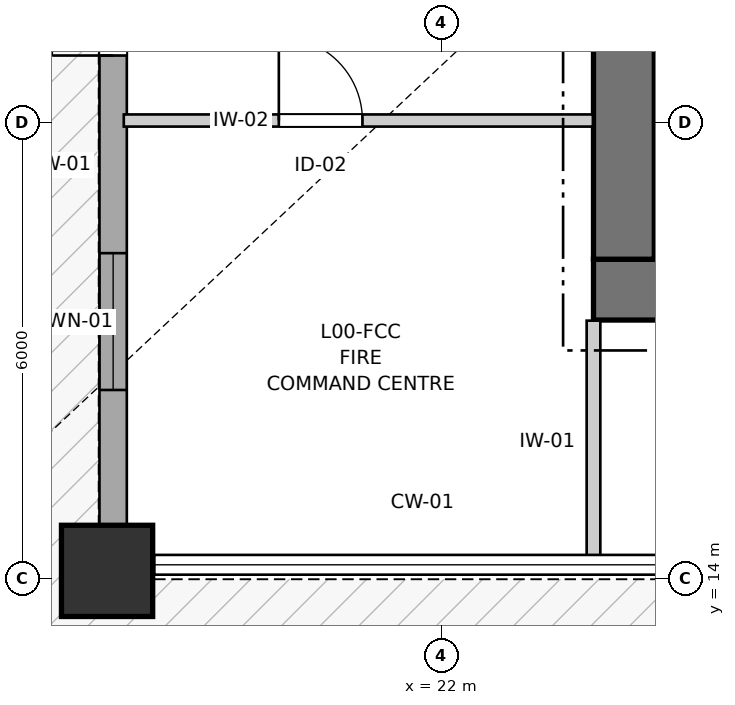
"""IFC4 building model, lengths in metres.
Left out: names, types, materials, properties, quantities, classifications, styles, units other than length and angle.
Written with IfcOpenShell. Run it as: python <this file> out.ifc"""

import sys

from ifc_helpers import new_model, si_unit, direction, frame, frame_2d, origin, origin_2d, place, context, subcontext, project, spatial, rectangle, extrude, source, transform, mapped, element, fill, save


model = new_model("IFC4")
c1 = context("Model", 3, precision=1e-05, world=origin(), true_north=direction((0.0, 1.0)))
c2 = subcontext(c1, "Body", "Model", "MODEL_VIEW")
j1 = project(units=[si_unit("LENGTHUNIT", "METRE"), si_unit("PLANEANGLEUNIT", "RADIAN")], contexts=[c1])
p1 = place(None, origin())
s1 = spatial("IfcSite", under=j1, at=p1, CompositionType="ELEMENT")
p2 = place(p1, origin())
s2 = spatial("IfcBuilding", under=s1, at=p2, CompositionType="ELEMENT")
p3 = place(p2, origin())
s3 = spatial("IfcBuildingStorey", under=s2, at=p3, CompositionType="ELEMENT", Elevation=0.0)
m1 = source(origin(), c2, "Body", "SweptSolid", [
    extrude(rectangle(XDim=1.2, YDim=1.2, at=origin_2d()), origin(), (0.0, 0.0, 1.0), 7.54),
])
p4 = place(p3, frame((17.6, 14.1, 0.0), z_axis=(0.0, 0.0, 1.0), x_axis=(1.0, 0.0, 0.0)))
e1 = element("IfcColumn", 1, at=p4, inside=s3, PredefinedType="COLUMN", context=c2, shape_type="MappedRepresentation", body=[
    mapped(m1, transform((0.0, 0.0, 0.0), x_axis=(1.0, 0.0, 0.0), y_axis=(0.0, 1.0, 0.0), z_axis=(0.0, 0.0, 1.0), scale=1.0)),
])
p5 = place(p3, frame((24.0, 17.8, 0.0), z_axis=(0.0, 0.0, 1.0), x_axis=(1.0, 0.0, 0.0)))
e2 = element("IfcWall", 2, at=p5, inside=s3, PredefinedType="SHEAR", context=c2, shape_type="SweptSolid", body=[
    extrude(rectangle(XDim=12.7, YDim=0.8, at=frame_2d((6.35, 0.0))), origin(), (0.0, 0.0, 1.0), 7.54),
])
p6 = place(p5, frame((7.0, 0.0, 0.0)))
e3 = element("IfcOpeningElement", 3, at=p6, cuts=e2, PredefinedType="OPENING", context=c2, shape_type="SweptSolid", body=[
    extrude(rectangle(XDim=0.98, YDim=2.15, at=frame_2d((0.49, 1.075))), frame((0.0, 0.41, 0.0), z_axis=(0.0, -1.0, 0.0), x_axis=(1.0, 0.0, 0.0)), (0.0, 0.0, 1.0), 0.82),
])
p7 = place(p3, frame((24.4, 33.8, 0.0), z_axis=(0.0, 0.0, 1.0), x_axis=(0.0, -1.0, 0.0)))
e4 = element("IfcWall", 4, at=p7, inside=s3, PredefinedType="SHEAR", context=c2, shape_type="SweptSolid", body=[
    extrude(rectangle(XDim=15.6, YDim=0.8, at=frame_2d((7.8, 0.0))), origin(), (0.0, 0.0, 1.0), 7.54),
])
p8 = place(p7, frame((7.05, 0.0, 0.0)))
e5 = element("IfcOpeningElement", 5, at=p8, cuts=e4, PredefinedType="OPENING", context=c2, shape_type="SweptSolid", body=[
    extrude(rectangle(XDim=1.5, YDim=2.15, at=frame_2d((0.75, 1.075))), frame((0.0, 0.41, 0.0), z_axis=(0.0, -1.0, 0.0), x_axis=(1.0, 0.0, 0.0)), (0.0, 0.0, 1.0), 0.82),
])
p9 = place(p7, frame((3.52, 0.0, 0.0)))
e6 = element("IfcOpeningElement", 6, at=p9, cuts=e4, PredefinedType="OPENING", context=c2, shape_type="SweptSolid", body=[
    extrude(rectangle(XDim=0.86, YDim=2.05, at=frame_2d((0.43, 1.025))), frame((0.0, 0.41, 0.0), z_axis=(0.0, -1.0, 0.0), x_axis=(1.0, 0.0, 0.0)), (0.0, 0.0, 1.0), 0.82),
])
p10 = place(p7, frame((11.22, 0.0, 0.0)))
e7 = element("IfcOpeningElement", 7, at=p10, cuts=e4, PredefinedType="OPENING", context=c2, shape_type="SweptSolid", body=[
    extrude(rectangle(XDim=0.86, YDim=2.05, at=frame_2d((0.43, 1.025))), frame((0.0, 0.41, 0.0), z_axis=(0.0, -1.0, 0.0), x_axis=(1.0, 0.0, 0.0)), (0.0, 0.0, 1.0), 0.82),
])
p11 = place(p3, frame((17.68, 14.68, 0.0), z_axis=(0.0, 0.0, 1.0), x_axis=(0.0, 1.0, 0.0)))
e8 = element("IfcWall", 8, at=p11, inside=s3, PredefinedType="SOLIDWALL", context=c2, shape_type="SweptSolid", body=[
    extrude(rectangle(XDim=9.53, YDim=0.36, at=frame_2d((4.765, 0.0))), origin(), (0.0, 0.0, 1.0), 6.02),
])
p12 = place(p11, frame((6.2, 0.0, 0.0)))
e9 = element("IfcOpeningElement", 9, at=p12, cuts=e8, PredefinedType="OPENING", context=c2, shape_type="SweptSolid", body=[
    extrude(rectangle(XDim=1.6, YDim=2.2, at=frame_2d((0.8, 1.1))), frame((0.0, 0.19, 0.0), z_axis=(0.0, -1.0, 0.0), x_axis=(1.0, 0.0, 0.0)), (0.0, 0.0, 1.0), 0.38),
])
p13 = place(p11, frame((1.8, 0.0, 1.0)))
e10 = element("IfcOpeningElement", 10, at=p13, cuts=e8, PredefinedType="OPENING", context=c2, shape_type="SweptSolid", body=[
    extrude(rectangle(XDim=1.8, YDim=1.45, at=frame_2d((0.9, 0.725))), frame((0.0, 0.19, 0.0), z_axis=(0.0, -1.0, 0.0), x_axis=(1.0, 0.0, 0.0)), (0.0, 0.0, 1.0), 0.38),
])
p14 = place(p3, frame((17.82, 20.025, 0.0), z_axis=(0.0, 0.0, 1.0), x_axis=(1.0, 0.0, 0.0)))
e11 = element("IfcWall", 11, at=p14, inside=s3, PredefinedType="PARTITIONING", context=c2, shape_type="SweptSolid", body=[
    extrude(rectangle(XDim=6.172, YDim=0.16, at=frame_2d((3.086, 0.0))), origin(), (0.0, 0.0, 1.0), 7.54),
])
p15 = place(p14, frame((2.04, 0.0, 0.0)))
e12 = element("IfcOpeningElement", 12, at=p15, cuts=e11, PredefinedType="OPENING", context=c2, shape_type="SweptSolid", body=[
    extrude(rectangle(XDim=1.1, YDim=2.15, at=frame_2d((0.55, 1.075))), frame((0.0, 0.09, 0.0), z_axis=(0.0, -1.0, 0.0), x_axis=(1.0, 0.0, 0.0)), (0.0, 0.0, 1.0), 0.18),
])
p16 = place(p3, frame((24.0, 14.207, 0.0), z_axis=(0.0, 0.0, 1.0), x_axis=(0.0, 1.0, 0.0)))
e13 = element("IfcWall", 13, at=p16, inside=s3, PredefinedType="PARTITIONING", context=c2, shape_type="SweptSolid", body=[
    extrude(rectangle(XDim=3.185, YDim=0.18, at=frame_2d((1.593, 0.0))), origin(), (0.0, 0.0, 1.0), 7.54),
])
m2 = source(origin(), c2, "Body", "SweptSolid", [
    extrude(rectangle(XDim=1.6, YDim=2.2, at=frame_2d((0.8, 1.1))), frame((0.0, 0.025, 0.0), z_axis=(0.0, -1.0, 0.0), x_axis=(1.0, 0.0, 0.0)), (0.0, 0.0, 1.0), 0.05),
])
p17 = place(p12, origin())
e14 = element("IfcDoor", 14, at=p17, inside=s3, OperationType="DOUBLE_DOOR_SINGLE_SWING", PredefinedType="DOOR", context=c2, shape_type="MappedRepresentation", body=[
    mapped(m2, transform((0.0, 0.0, 0.0), x_axis=(1.0, 0.0, 0.0), y_axis=(0.0, 1.0, 0.0), z_axis=(0.0, 0.0, 1.0), scale=1.0)),
])
fill(e9, e14)
m3 = source(origin(), c2, "Body", "SweptSolid", [
    extrude(rectangle(XDim=1.8, YDim=1.45, at=frame_2d((0.9, 0.725))), frame((0.0, 0.03, 0.0), z_axis=(0.0, -1.0, 0.0), x_axis=(1.0, 0.0, 0.0)), (0.0, 0.0, 1.0), 0.06),
])
p18 = place(p13, origin())
e15 = element("IfcWindow", 15, at=p18, inside=s3, PartitioningType="SINGLE_PANEL", PredefinedType="WINDOW", context=c2, shape_type="MappedRepresentation", body=[
    mapped(m3, transform((0.0, 0.0, 0.0), x_axis=(1.0, 0.0, 0.0), y_axis=(0.0, 1.0, 0.0), z_axis=(0.0, 0.0, 1.0), scale=1.0)),
])
fill(e10, e15)
m4 = source(origin(), c2, "Body", "SweptSolid", [
    extrude(rectangle(XDim=1.1, YDim=2.15, at=frame_2d((0.55, 1.075))), frame((0.0, 0.025, 0.0), z_axis=(0.0, -1.0, 0.0), x_axis=(1.0, 0.0, 0.0)), (0.0, 0.0, 1.0), 0.05),
])
p19 = place(p15, origin())
e16 = element("IfcDoor", 16, at=p19, inside=s3, OperationType="SINGLE_SWING_LEFT", PredefinedType="DOOR", context=c2, shape_type="MappedRepresentation", body=[
    mapped(m4, transform((0.0, 0.0, 0.0), x_axis=(1.0, 0.0, 0.0), y_axis=(0.0, 1.0, 0.0), z_axis=(0.0, 0.0, 1.0), scale=1.0)),
])
fill(e12, e16)
save(model, sys.argv[1])
